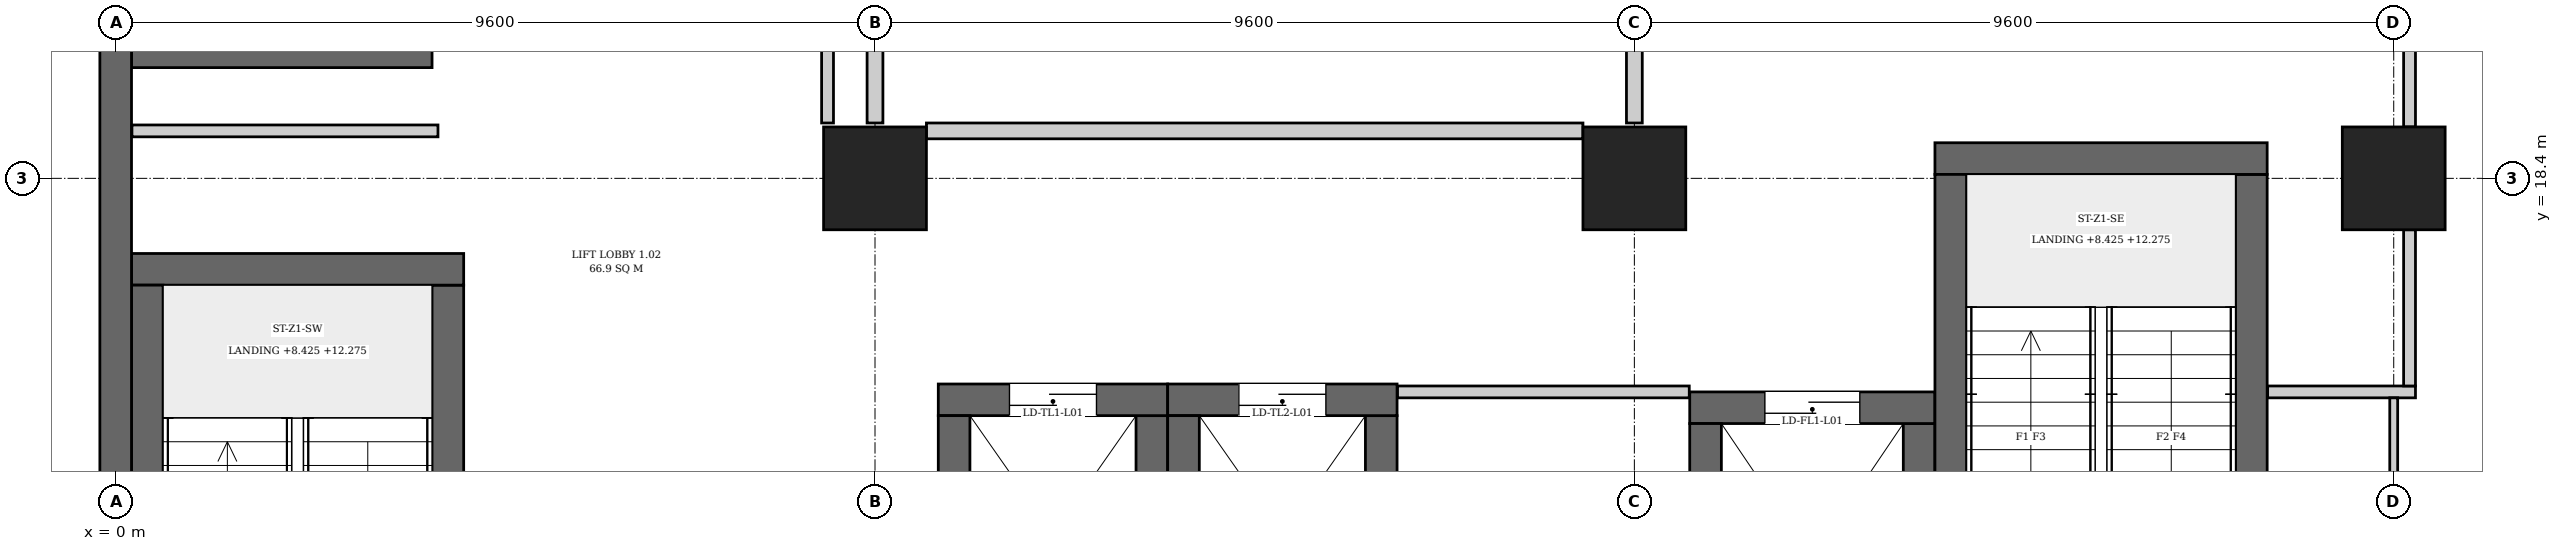
"""IFC4 building model, lengths in metres.
Left out: names, types, materials, properties, quantities, classifications, styles, units other than length and angle.
Written with IfcOpenShell. Run it as: python <this file> out.ifc"""

import sys

from ifc_helpers import new_model, si_unit, direction, frame, frame_2d, origin, origin_2d, place, context, subcontext, project, spatial, rectangle, extrude, element, fill, save


model = new_model("IFC4")
c1 = context("Model", 3, precision=1e-05, world=origin(), true_north=direction((0.0, 1.0)))
c2 = subcontext(c1, "Body", "Model", "MODEL_VIEW")
j1 = project(units=[si_unit("LENGTHUNIT", "METRE"), si_unit("PLANEANGLEUNIT", "RADIAN")], contexts=[c1])
p1 = place(None, origin())
s1 = spatial("IfcSite", under=j1, at=p1, CompositionType="ELEMENT")
p2 = place(p1, origin())
s2 = spatial("IfcBuilding", under=s1, at=p2, CompositionType="ELEMENT")
p3 = place(p2, frame((0.0, 0.0, 6.5)))
s3 = spatial("IfcBuildingStorey", under=s2, at=p3, CompositionType="ELEMENT", Elevation=6.5)
p4 = place(p3, frame((0.0, -0.2, 0.0), z_axis=(0.0, 0.0, 1.0), x_axis=(0.0, 1.0, 0.0)))
e1 = element("IfcWall", 1, at=p4, inside=s3, PredefinedType="SHEAR", context=c2, shape_type="SweptSolid", body=[
    extrude(rectangle(XDim=46.88, YDim=0.4, at=frame_2d((23.44, 0.0))), origin(), (0.0, 0.0, 1.0), 7.7),
])
p5 = place(p3, frame((0.2, 17.25, 0.0), z_axis=(0.0, 0.0, 1.0), x_axis=(1.0, 0.0, 0.0)))
e2 = element("IfcWall", 2, at=p5, inside=s3, PredefinedType="SHEAR", context=c2, shape_type="SweptSolid", body=[
    extrude(rectangle(XDim=4.2, YDim=0.4, at=frame_2d((2.1, 0.0))), origin(), (0.0, 0.0, 1.0), 7.7),
])
for number, where, z_axis, x_axis in (
    (3, (0.4, 10.45, 0.0), (0.0, 0.0, 1.0), (0.0, 1.0, 0.0)),
    (4, (4.2, 10.45, 0.0), (0.0, 0.0, 1.0), (0.0, 1.0, 0.0)),
):
    element("IfcWall", number, at=place(p3, frame(where, z_axis=z_axis, x_axis=x_axis)), inside=s3, PredefinedType="SHEAR", context=c2, shape_type="SweptSolid", body=[
        extrude(rectangle(XDim=6.6, YDim=0.4, at=frame_2d((3.3, 0.0))), origin(), (0.0, 0.0, 1.0), 7.7),
    ])
p6 = place(p3, frame((23.0, 18.65, 0.0), z_axis=(0.0, 0.0, 1.0), x_axis=(1.0, 0.0, 0.0)))
e5 = element("IfcWall", 5, at=p6, inside=s3, PredefinedType="SHEAR", context=c2, shape_type="SweptSolid", body=[
    extrude(rectangle(XDim=4.2, YDim=0.4, at=frame_2d((2.1, 0.0))), origin(), (0.0, 0.0, 1.0), 7.7),
])
for number, where, z_axis, x_axis in (
    (6, (23.2, 11.85, 0.0), (0.0, 0.0, 1.0), (0.0, 1.0, 0.0)),
    (7, (27.0, 11.85, 0.0), (0.0, 0.0, 1.0), (0.0, 1.0, 0.0)),
):
    element("IfcWall", number, at=place(p3, frame(where, z_axis=z_axis, x_axis=x_axis)), inside=s3, PredefinedType="SHEAR", context=c2, shape_type="SweptSolid", body=[
        extrude(rectangle(XDim=6.6, YDim=0.4, at=frame_2d((3.3, 0.0))), origin(), (0.0, 0.0, 1.0), 7.7),
    ])
p7 = place(p3, frame((0.2, 19.975, 0.0), z_axis=(0.0, 0.0, 1.0), x_axis=(1.0, 0.0, 0.0)))
e8 = element("IfcWall", 8, at=p7, inside=s3, PredefinedType="SHEAR", context=c2, shape_type="SweptSolid", body=[
    extrude(rectangle(XDim=3.8, YDim=0.35, at=frame_2d((1.9, 0.0))), origin(), (0.0, 0.0, 1.0), 7.7),
])
p8 = place(p3, frame((10.4, 15.6, 0.0), z_axis=(0.0, 0.0, 1.0), x_axis=(1.0, 0.0, 0.0)))
e9 = element("IfcWall", 9, at=p8, inside=s3, PredefinedType="SHEAR", context=c2, shape_type="SweptSolid", body=[
    extrude(rectangle(XDim=2.9, YDim=0.4, at=frame_2d((1.45, 0.0))), origin(), (0.0, 0.0, 1.0), 7.7),
])
p9 = place(p8, frame((0.9, 0.0, 0.0)))
e10 = element("IfcOpeningElement", 10, at=p9, cuts=e9, PredefinedType="OPENING", context=c2, shape_type="SweptSolid", body=[
    extrude(rectangle(XDim=1.1, YDim=2.1, at=frame_2d((0.55, 1.05))), frame((0.0, 0.21, 0.0), z_axis=(0.0, -1.0, 0.0), x_axis=(1.0, 0.0, 0.0)), (0.0, 0.0, 1.0), 0.42),
])
for number, where, z_axis, x_axis in (
    (11, (10.6, 12.4, 0.0), (0.0, 0.0, 1.0), (0.0, 1.0, 0.0)),
    (12, (13.1, 12.4, 0.0), (0.0, 0.0, 1.0), (0.0, 1.0, 0.0)),
):
    element("IfcWall", number, at=place(p3, frame(where, z_axis=z_axis, x_axis=x_axis)), inside=s3, PredefinedType="SHEAR", context=c2, shape_type="SweptSolid", body=[
        extrude(rectangle(XDim=3.0, YDim=0.4, at=frame_2d((1.5, 0.0))), origin(), (0.0, 0.0, 1.0), 7.7),
    ])
p10 = place(p3, frame((13.3, 15.6, 0.0), z_axis=(0.0, 0.0, 1.0), x_axis=(1.0, 0.0, 0.0)))
e13 = element("IfcWall", 13, at=p10, inside=s3, PredefinedType="SHEAR", context=c2, shape_type="SweptSolid", body=[
    extrude(rectangle(XDim=2.9, YDim=0.4, at=frame_2d((1.45, 0.0))), origin(), (0.0, 0.0, 1.0), 7.7),
])
p11 = place(p10, frame((0.9, 0.0, 0.0)))
e14 = element("IfcOpeningElement", 14, at=p11, cuts=e13, PredefinedType="OPENING", context=c2, shape_type="SweptSolid", body=[
    extrude(rectangle(XDim=1.1, YDim=2.1, at=frame_2d((0.55, 1.05))), frame((0.0, 0.21, 0.0), z_axis=(0.0, -1.0, 0.0), x_axis=(1.0, 0.0, 0.0)), (0.0, 0.0, 1.0), 0.42),
])
for number, where, z_axis, x_axis in (
    (15, (13.5, 12.4, 0.0), (0.0, 0.0, 1.0), (0.0, 1.0, 0.0)),
    (16, (16.0, 12.4, 0.0), (0.0, 0.0, 1.0), (0.0, 1.0, 0.0)),
):
    element("IfcWall", number, at=place(p3, frame(where, z_axis=z_axis, x_axis=x_axis)), inside=s3, PredefinedType="SHEAR", context=c2, shape_type="SweptSolid", body=[
        extrude(rectangle(XDim=3.0, YDim=0.4, at=frame_2d((1.5, 0.0))), origin(), (0.0, 0.0, 1.0), 7.7),
    ])
p12 = place(p3, frame((19.9, 15.5, 0.0), z_axis=(0.0, 0.0, 1.0), x_axis=(1.0, 0.0, 0.0)))
e17 = element("IfcWall", 17, at=p12, inside=s3, PredefinedType="SHEAR", context=c2, shape_type="SweptSolid", body=[
    extrude(rectangle(XDim=3.1, YDim=0.4, at=frame_2d((1.55, 0.0))), origin(), (0.0, 0.0, 1.0), 7.7),
])
p13 = place(p12, frame((0.95, 0.0, 0.0)))
e18 = element("IfcOpeningElement", 18, at=p13, cuts=e17, PredefinedType="OPENING", context=c2, shape_type="SweptSolid", body=[
    extrude(rectangle(XDim=1.2, YDim=2.1, at=frame_2d((0.6, 1.05))), frame((0.0, 0.21, 0.0), z_axis=(0.0, -1.0, 0.0), x_axis=(1.0, 0.0, 0.0)), (0.0, 0.0, 1.0), 0.42),
])
for number, where, z_axis, x_axis in (
    (19, (20.1, 11.9, 0.0), (0.0, 0.0, 1.0), (0.0, 1.0, 0.0)),
    (20, (22.8, 11.9, 0.0), (0.0, 0.0, 1.0), (0.0, 1.0, 0.0)),
):
    element("IfcWall", number, at=place(p3, frame(where, z_axis=z_axis, x_axis=x_axis)), inside=s3, PredefinedType="SHEAR", context=c2, shape_type="SweptSolid", body=[
        extrude(rectangle(XDim=3.4, YDim=0.4, at=frame_2d((1.7, 0.0))), origin(), (0.0, 0.0, 1.0), 7.7),
    ])
for number, where, z_axis, x_axis in (
    (21, (9.6, 18.4, 0.0), (0.0, 0.0, 1.0), (1.0, 0.0, 0.0)),
    (22, (19.2, 18.4, 0.0), (0.0, 0.0, 1.0), (1.0, 0.0, 0.0)),
    (23, (28.8, 18.4, 0.0), (0.0, 0.0, 1.0), (1.0, 0.0, 0.0)),
):
    element("IfcColumn", number, at=place(p3, frame(where, z_axis=z_axis, x_axis=x_axis)), inside=s3, PredefinedType="COLUMN", context=c2, shape_type="SweptSolid", body=[
        extrude(rectangle(XDim=1.3, YDim=1.3, at=origin_2d()), origin(), (0.0, 0.0, 1.0), 7.7),
    ])
p14 = place(p3, frame((0.206, 19.0, 0.0), z_axis=(0.0, 0.0, 1.0), x_axis=(1.0, 0.0, 0.0)))
e24 = element("IfcWall", 24, at=p14, inside=s3, PredefinedType="PARTITIONING", context=c2, shape_type="SweptSolid", body=[
    extrude(rectangle(XDim=3.869, YDim=0.15, at=frame_2d((1.935, 0.0))), origin(), (0.0, 0.0, 1.0), 7.35),
])
p15 = place(p3, frame((9.0, 19.1, 0.0), z_axis=(0.0, 0.0, 1.0), x_axis=(0.0, 1.0, 0.0)))
e25 = element("IfcWall", 25, at=p15, inside=s3, PredefinedType="PARTITIONING", context=c2, shape_type="SweptSolid", body=[
    extrude(rectangle(XDim=2.3, YDim=0.15, at=frame_2d((1.15, 0.0))), origin(), (0.0, 0.0, 1.0), 6.95),
])
p16 = place(p3, frame((9.6, 19.1, 0.0), z_axis=(0.0, 0.0, 1.0), x_axis=(0.0, 1.0, 0.0)))
e26 = element("IfcWall", 26, at=p16, inside=s3, PredefinedType="PARTITIONING", context=c2, shape_type="SweptSolid", body=[
    extrude(rectangle(XDim=2.3, YDim=0.2, at=frame_2d((1.15, 0.0))), origin(), (0.0, 0.0, 1.0), 6.95),
])
p17 = place(p3, frame((10.25, 19.0, 0.0), z_axis=(0.0, 0.0, 1.0), x_axis=(1.0, 0.0, 0.0)))
e27 = element("IfcWall", 27, at=p17, inside=s3, PredefinedType="PARTITIONING", context=c2, shape_type="SweptSolid", body=[
    extrude(rectangle(XDim=8.3, YDim=0.2, at=frame_2d((4.15, 0.0))), origin(), (0.0, 0.0, 1.0), 7.35),
])
p18 = place(p3, frame((16.206, 15.7, 0.0), z_axis=(0.0, 0.0, 1.0), x_axis=(1.0, 0.0, 0.0)))
e28 = element("IfcWall", 28, at=p18, inside=s3, PredefinedType="PARTITIONING", context=c2, shape_type="SweptSolid", body=[
    extrude(rectangle(XDim=3.688, YDim=0.15, at=frame_2d((1.844, 0.0))), origin(), (0.0, 0.0, 1.0), 7.35),
])
p19 = place(p3, frame((19.2, 19.1, 0.0), z_axis=(0.0, 0.0, 1.0), x_axis=(0.0, 1.0, 0.0)))
e29 = element("IfcWall", 29, at=p19, inside=s3, PredefinedType="PARTITIONING", context=c2, shape_type="SweptSolid", body=[
    extrude(rectangle(XDim=2.3, YDim=0.2, at=frame_2d((1.15, 0.0))), origin(), (0.0, 0.0, 1.0), 6.95),
])
p20 = place(p3, frame((27.206, 15.7, 0.0), z_axis=(0.0, 0.0, 1.0), x_axis=(1.0, 0.0, 0.0)))
e30 = element("IfcWall", 30, at=p20, inside=s3, PredefinedType="PARTITIONING", context=c2, shape_type="SweptSolid", body=[
    extrude(rectangle(XDim=1.869, YDim=0.15, at=frame_2d((0.935, 0.0))), origin(), (0.0, 0.0, 1.0), 7.35),
])
p21 = place(p3, frame((28.8, 11.6, 0.0), z_axis=(0.0, 0.0, 1.0), x_axis=(0.0, 1.0, 0.0)))
e31 = element("IfcWall", 31, at=p21, inside=s3, PredefinedType="PARTITIONING", context=c2, shape_type="SweptSolid", body=[
    extrude(rectangle(XDim=4.025, YDim=0.1, at=frame_2d((2.012, 0.0))), origin(), (0.0, 0.0, 1.0), 6.95),
])
p22 = place(p3, frame((29.0, 15.775, 0.0), z_axis=(0.0, 0.0, 1.0), x_axis=(0.0, 1.0, 0.0)))
e32 = element("IfcWall", 32, at=p22, inside=s3, PredefinedType="PARTITIONING", context=c2, shape_type="SweptSolid", body=[
    extrude(rectangle(XDim=1.975, YDim=0.15, at=frame_2d((0.988, 0.0))), origin(), (0.0, 0.0, 1.0), 6.95),
])
p23 = place(p3, frame((29.0, 19.05, 0.0), z_axis=(0.0, 0.0, 1.0), x_axis=(0.0, 1.0, 0.0)))
e33 = element("IfcWall", 33, at=p23, inside=s3, PredefinedType="PARTITIONING", context=c2, shape_type="SweptSolid", body=[
    extrude(rectangle(XDim=2.375, YDim=0.15, at=frame_2d((1.188, 0.0))), origin(), (0.0, 0.0, 1.0), 6.95),
])
p24 = place(p9, origin())
e34 = element("IfcDoor", 34, at=p24, inside=s3, OperationType="DOUBLE_DOOR_SLIDING", PredefinedType="DOOR", context=c2, shape_type="SweptSolid", body=[
    extrude(rectangle(XDim=1.1, YDim=2.1, at=frame_2d((0.55, 1.05))), frame((0.0, 0.025, 0.0), z_axis=(0.0, -1.0, 0.0), x_axis=(1.0, 0.0, 0.0)), (0.0, 0.0, 1.0), 0.05),
])
fill(e10, e34)
p25 = place(p11, origin())
e35 = element("IfcDoor", 35, at=p25, inside=s3, OperationType="DOUBLE_DOOR_SLIDING", PredefinedType="DOOR", context=c2, shape_type="SweptSolid", body=[
    extrude(rectangle(XDim=1.1, YDim=2.1, at=frame_2d((0.55, 1.05))), frame((0.0, 0.025, 0.0), z_axis=(0.0, -1.0, 0.0), x_axis=(1.0, 0.0, 0.0)), (0.0, 0.0, 1.0), 0.05),
])
fill(e14, e35)
p26 = place(p13, origin())
e36 = element("IfcDoor", 36, at=p26, inside=s3, OperationType="DOUBLE_DOOR_SLIDING", PredefinedType="DOOR", context=c2, shape_type="SweptSolid", body=[
    extrude(rectangle(XDim=1.2, YDim=2.1, at=frame_2d((0.6, 1.05))), frame((0.0, 0.025, 0.0), z_axis=(0.0, -1.0, 0.0), x_axis=(1.0, 0.0, 0.0)), (0.0, 0.0, 1.0), 0.05),
])
fill(e18, e36)
save(model, sys.argv[1])
